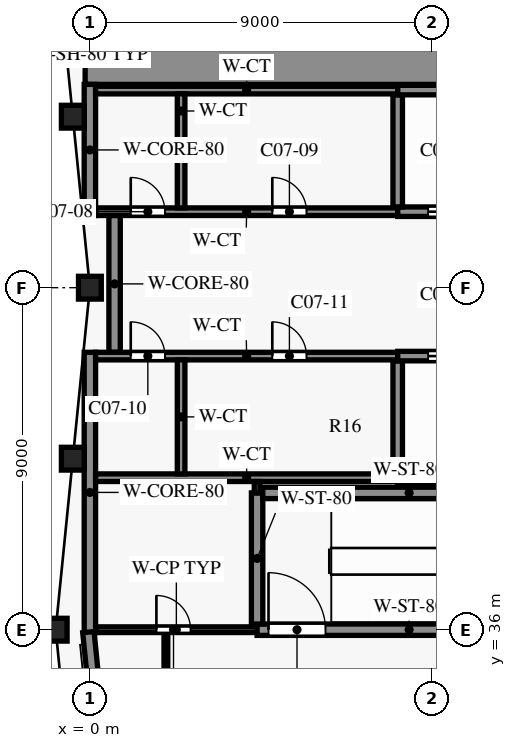
"""IFC4 building model, lengths in metres.
Left out: names, types, materials, properties, quantities, classifications, styles, units other than length and angle.
Written with IfcOpenShell. Run it as: python <this file> out.ifc"""

import sys

from ifc_helpers import new_model, si_unit, direction, frame, frame_2d, origin, origin_2d, place, context, subcontext, project, spatial, rectangle, hollow_rectangle, extrude, element, fill, save


model = new_model("IFC4")
c1 = context("Model", 3, precision=1e-05, world=origin(), true_north=direction((0.0, 1.0)))
c2 = subcontext(c1, "Body", "Model", "MODEL_VIEW")
j1 = project(units=[si_unit("LENGTHUNIT", "METRE"), si_unit("PLANEANGLEUNIT", "RADIAN")], contexts=[c1])
p1 = place(None, origin())
s1 = spatial("IfcSite", under=j1, at=p1, CompositionType="ELEMENT")
p2 = place(p1, origin())
s2 = spatial("IfcBuilding", under=s1, at=p2, CompositionType="ELEMENT")
p3 = place(p2, frame((0.0, 0.0, 32.0)))
s3 = spatial("IfcBuildingStorey", under=s2, at=p3, CompositionType="ELEMENT", Elevation=32.0)
for number, where, z_axis, x_axis in (
    (1, (-0.45, 49.5, 0.0), (0.0, 0.0, 1.0), (1.0, 0.0, 0.0)),
    (2, (0.0, 45.0, 0.0), (0.0, 0.0, 1.0), (1.0, 0.0, 0.0)),
    (3, (-0.45, 40.5, 0.0), (0.0, 0.0, 1.0), (1.0, 0.0, 0.0)),
    (4, (-0.9, 36.0, 0.0), (0.0, 0.0, 1.0), (1.0, 0.0, 0.0)),
):
    element("IfcColumn", number, at=place(p3, frame(where, z_axis=z_axis, x_axis=x_axis)), inside=s3, PredefinedType="COLUMN", context=c2, shape_type="SweptSolid", body=[
        extrude(hollow_rectangle(XDim=0.6, YDim=0.6, WallThickness=0.03, InnerFilletRadius=0.03, OuterFilletRadius=0.06, at=origin_2d()), origin(), (0.0, 0.0, 1.0), 5.5),
    ])
p4 = place(p3, frame((0.856, 26.985, 0.0), z_axis=(0.0, 0.0, 1.0), x_axis=(-0.099503719021, 0.99503719021, 0.0)))
e5 = element("IfcWall", 5, at=p4, inside=s3, PredefinedType="SOLIDWALL", context=c2, shape_type="SweptSolid", body=[
    extrude(rectangle(XDim=8.995, YDim=0.3, at=frame_2d((4.498, 0.0))), origin(), (0.0, 0.0, 1.0), 4.85),
])
p5 = place(p3, frame((0.15, 36.0, 0.0), z_axis=(0.0, 0.0, 1.0), x_axis=(1.0, 0.0, 0.0)))
e6 = element("IfcWall", 6, at=p5, inside=s3, PredefinedType="PARTITIONING", context=c2, shape_type="SweptSolid", body=[
    extrude(rectangle(XDim=4.25, YDim=0.15, at=frame_2d((2.125, 0.0))), origin(), (0.0, 0.0, 1.0), 5.2),
])
p6 = place(p5, frame((1.6, 0.0, 0.0)))
e7 = element("IfcOpeningElement", 7, at=p6, cuts=e6, PredefinedType="OPENING", context=c2, shape_type="SweptSolid", body=[
    extrude(rectangle(XDim=0.9, YDim=2.1, at=frame_2d((0.45, 1.05))), frame((0.0, 0.085, 0.0), z_axis=(0.0, -1.0, 0.0), x_axis=(1.0, 0.0, 0.0)), (0.0, 0.0, 1.0), 0.17),
])
p7 = place(p3, frame((4.4, 36.0, 0.0), z_axis=(0.0, 0.0, 1.0), x_axis=(1.0, 0.0, 0.0)))
e8 = element("IfcWall", 8, at=p7, inside=s3, PredefinedType="SHEAR", context=c2, shape_type="SweptSolid", body=[
    extrude(rectangle(XDim=8.0, YDim=0.3, at=frame_2d((4.0, 0.0))), origin(), (0.0, 0.0, 1.0), 5.2),
])
p8 = place(p7, frame((0.3, 0.0, 0.0)))
e9 = element("IfcOpeningElement", 9, at=p8, cuts=e8, PredefinedType="OPENING", context=c2, shape_type="SweptSolid", body=[
    extrude(rectangle(XDim=1.5, YDim=2.2, at=frame_2d((0.75, 1.1))), frame((0.0, 0.16, 0.0), z_axis=(0.0, -1.0, 0.0), x_axis=(1.0, 0.0, 0.0)), (0.0, 0.0, 1.0), 0.32),
])
p9 = place(p3, frame((4.55, 39.6, 0.0), z_axis=(0.0, 0.0, 1.0), x_axis=(1.0, 0.0, 0.0)))
e10 = element("IfcWall", 10, at=p9, inside=s3, PredefinedType="SHEAR", context=c2, shape_type="SweptSolid", body=[
    extrude(rectangle(XDim=7.7, YDim=0.3, at=frame_2d((3.85, 0.0))), origin(), (0.0, 0.0, 1.0), 5.2),
])
p10 = place(p3, frame((0.15, 40.0, 0.0), z_axis=(0.0, 0.0, 1.0), x_axis=(1.0, 0.0, 0.0)))
e11 = element("IfcWall", 11, at=p10, inside=s3, PredefinedType="PARTITIONING", context=c2, shape_type="SweptSolid", body=[
    extrude(rectangle(XDim=7.95, YDim=0.2, at=frame_2d((3.975, 0.0))), origin(), (0.0, 0.0, 1.0), 5.2),
])
p11 = place(p3, frame((8.1, 40.0, 0.0), z_axis=(0.0, 0.0, 1.0), x_axis=(1.0, 0.0, 0.0)))
e12 = element("IfcWall", 12, at=p11, inside=s3, PredefinedType="SHEAR", context=c2, shape_type="SweptSolid", body=[
    extrude(rectangle(XDim=16.075, YDim=0.25, at=frame_2d((8.038, 0.0))), origin(), (0.0, 0.0, 1.0), 5.2),
])
p12 = place(p3, frame((0.15, 43.2, 0.0), z_axis=(0.0, 0.0, 1.0), x_axis=(1.0, 0.0, 0.0)))
e13 = element("IfcWall", 13, at=p12, inside=s3, PredefinedType="PARTITIONING", context=c2, shape_type="SweptSolid", body=[
    extrude(rectangle(XDim=7.95, YDim=0.2, at=frame_2d((3.975, 0.0))), origin(), (0.0, 0.0, 1.0), 5.2),
])
p13 = place(p12, frame((0.925, 0.0, 0.0)))
e14 = element("IfcOpeningElement", 14, at=p13, cuts=e13, PredefinedType="OPENING", context=c2, shape_type="SweptSolid", body=[
    extrude(rectangle(XDim=0.9, YDim=2.1, at=frame_2d((0.45, 1.05))), frame((0.0, 0.11, 0.0), z_axis=(0.0, -1.0, 0.0), x_axis=(1.0, 0.0, 0.0)), (0.0, 0.0, 1.0), 0.22),
])
p14 = place(p12, frame((4.65, 0.0, 0.0)))
e15 = element("IfcOpeningElement", 15, at=p14, cuts=e13, PredefinedType="OPENING", context=c2, shape_type="SweptSolid", body=[
    extrude(rectangle(XDim=0.9, YDim=2.1, at=frame_2d((0.45, 1.05))), frame((0.0, 0.11, 0.0), z_axis=(0.0, -1.0, 0.0), x_axis=(1.0, 0.0, 0.0)), (0.0, 0.0, 1.0), 0.22),
])
p15 = place(p3, frame((8.1, 43.2, 0.0), z_axis=(0.0, 0.0, 1.0), x_axis=(1.0, 0.0, 0.0)))
e16 = element("IfcWall", 16, at=p15, inside=s3, PredefinedType="SHEAR", context=c2, shape_type="SweptSolid", body=[
    extrude(rectangle(XDim=16.075, YDim=0.25, at=frame_2d((8.038, 0.0))), origin(), (0.0, 0.0, 1.0), 5.2),
])
p16 = place(p15, frame((14.3, 0.0, 0.0)))
e17 = element("IfcOpeningElement", 17, at=p16, cuts=e16, PredefinedType="OPENING", context=c2, shape_type="SweptSolid", body=[
    extrude(rectangle(XDim=1.1, YDim=2.1, at=frame_2d((0.55, 1.05))), frame((0.0, 0.135, 0.0), z_axis=(0.0, -1.0, 0.0), x_axis=(1.0, 0.0, 0.0)), (0.0, 0.0, 1.0), 0.27),
])
p17 = place(p15, frame((0.8, 0.0, 0.0)))
e18 = element("IfcOpeningElement", 18, at=p17, cuts=e16, PredefinedType="OPENING", context=c2, shape_type="SweptSolid", body=[
    extrude(rectangle(XDim=1.1, YDim=2.1, at=frame_2d((0.55, 1.05))), frame((0.0, 0.135, 0.0), z_axis=(0.0, -1.0, 0.0), x_axis=(1.0, 0.0, 0.0)), (0.0, 0.0, 1.0), 0.27),
])
p18 = place(p15, frame((3.5, 0.0, 0.0)))
e19 = element("IfcOpeningElement", 19, at=p18, cuts=e16, PredefinedType="OPENING", context=c2, shape_type="SweptSolid", body=[
    extrude(rectangle(XDim=1.1, YDim=2.1, at=frame_2d((0.55, 1.05))), frame((0.0, 0.135, 0.0), z_axis=(0.0, -1.0, 0.0), x_axis=(1.0, 0.0, 0.0)), (0.0, 0.0, 1.0), 0.27),
])
p19 = place(p15, frame((6.2, 0.0, 0.0)))
e20 = element("IfcOpeningElement", 20, at=p19, cuts=e16, PredefinedType="OPENING", context=c2, shape_type="SweptSolid", body=[
    extrude(rectangle(XDim=1.1, YDim=2.1, at=frame_2d((0.55, 1.05))), frame((0.0, 0.135, 0.0), z_axis=(0.0, -1.0, 0.0), x_axis=(1.0, 0.0, 0.0)), (0.0, 0.0, 1.0), 0.27),
])
p20 = place(p15, frame((8.9, 0.0, 0.0)))
e21 = element("IfcOpeningElement", 21, at=p20, cuts=e16, PredefinedType="OPENING", context=c2, shape_type="SweptSolid", body=[
    extrude(rectangle(XDim=1.1, YDim=2.1, at=frame_2d((0.55, 1.05))), frame((0.0, 0.135, 0.0), z_axis=(0.0, -1.0, 0.0), x_axis=(1.0, 0.0, 0.0)), (0.0, 0.0, 1.0), 0.27),
])
p21 = place(p15, frame((11.6, 0.0, 0.0)))
e22 = element("IfcOpeningElement", 22, at=p21, cuts=e16, PredefinedType="OPENING", context=c2, shape_type="SweptSolid", body=[
    extrude(rectangle(XDim=1.1, YDim=2.1, at=frame_2d((0.55, 1.05))), frame((0.0, 0.135, 0.0), z_axis=(0.0, -1.0, 0.0), x_axis=(1.0, 0.0, 0.0)), (0.0, 0.0, 1.0), 0.27),
])
p22 = place(p3, frame((0.15, 47.0, 0.0), z_axis=(0.0, 0.0, 1.0), x_axis=(1.0, 0.0, 0.0)))
e23 = element("IfcWall", 23, at=p22, inside=s3, PredefinedType="PARTITIONING", context=c2, shape_type="SweptSolid", body=[
    extrude(rectangle(XDim=7.95, YDim=0.2, at=frame_2d((3.975, 0.0))), origin(), (0.0, 0.0, 1.0), 5.2),
])
p23 = place(p22, frame((0.925, 0.0, 0.0)))
e24 = element("IfcOpeningElement", 24, at=p23, cuts=e23, PredefinedType="OPENING", context=c2, shape_type="SweptSolid", body=[
    extrude(rectangle(XDim=0.9, YDim=2.1, at=frame_2d((0.45, 1.05))), frame((0.0, 0.11, 0.0), z_axis=(0.0, -1.0, 0.0), x_axis=(1.0, 0.0, 0.0)), (0.0, 0.0, 1.0), 0.22),
])
p24 = place(p22, frame((4.65, 0.0, 0.0)))
e25 = element("IfcOpeningElement", 25, at=p24, cuts=e23, PredefinedType="OPENING", context=c2, shape_type="SweptSolid", body=[
    extrude(rectangle(XDim=0.9, YDim=2.1, at=frame_2d((0.45, 1.05))), frame((0.0, 0.11, 0.0), z_axis=(0.0, -1.0, 0.0), x_axis=(1.0, 0.0, 0.0)), (0.0, 0.0, 1.0), 0.22),
])
p25 = place(p3, frame((8.1, 47.0, 0.0), z_axis=(0.0, 0.0, 1.0), x_axis=(1.0, 0.0, 0.0)))
e26 = element("IfcWall", 26, at=p25, inside=s3, PredefinedType="SHEAR", context=c2, shape_type="SweptSolid", body=[
    extrude(rectangle(XDim=13.5, YDim=0.25, at=frame_2d((6.75, 0.0))), origin(), (0.0, 0.0, 1.0), 5.2),
])
p26 = place(p25, frame((0.8, 0.0, 0.0)))
e27 = element("IfcOpeningElement", 27, at=p26, cuts=e26, PredefinedType="OPENING", context=c2, shape_type="SweptSolid", body=[
    extrude(rectangle(XDim=1.1, YDim=2.1, at=frame_2d((0.55, 1.05))), frame((0.0, 0.135, 0.0), z_axis=(0.0, -1.0, 0.0), x_axis=(1.0, 0.0, 0.0)), (0.0, 0.0, 1.0), 0.27),
])
p27 = place(p25, frame((3.5, 0.0, 0.0)))
e28 = element("IfcOpeningElement", 28, at=p27, cuts=e26, PredefinedType="OPENING", context=c2, shape_type="SweptSolid", body=[
    extrude(rectangle(XDim=1.1, YDim=2.1, at=frame_2d((0.55, 1.05))), frame((0.0, 0.135, 0.0), z_axis=(0.0, -1.0, 0.0), x_axis=(1.0, 0.0, 0.0)), (0.0, 0.0, 1.0), 0.27),
])
p28 = place(p25, frame((6.2, 0.0, 0.0)))
e29 = element("IfcOpeningElement", 29, at=p28, cuts=e26, PredefinedType="OPENING", context=c2, shape_type="SweptSolid", body=[
    extrude(rectangle(XDim=1.1, YDim=2.1, at=frame_2d((0.55, 1.05))), frame((0.0, 0.135, 0.0), z_axis=(0.0, -1.0, 0.0), x_axis=(1.0, 0.0, 0.0)), (0.0, 0.0, 1.0), 0.27),
])
p29 = place(p25, frame((8.9, 0.0, 0.0)))
e30 = element("IfcOpeningElement", 30, at=p29, cuts=e26, PredefinedType="OPENING", context=c2, shape_type="SweptSolid", body=[
    extrude(rectangle(XDim=1.1, YDim=2.1, at=frame_2d((0.55, 1.05))), frame((0.0, 0.135, 0.0), z_axis=(0.0, -1.0, 0.0), x_axis=(1.0, 0.0, 0.0)), (0.0, 0.0, 1.0), 0.27),
])
p30 = place(p25, frame((11.6, 0.0, 0.0)))
e31 = element("IfcOpeningElement", 31, at=p30, cuts=e26, PredefinedType="OPENING", context=c2, shape_type="SweptSolid", body=[
    extrude(rectangle(XDim=1.1, YDim=2.1, at=frame_2d((0.55, 1.05))), frame((0.0, 0.135, 0.0), z_axis=(0.0, -1.0, 0.0), x_axis=(1.0, 0.0, 0.0)), (0.0, 0.0, 1.0), 0.27),
])
p31 = place(p3, frame((0.15, 50.2, 0.0), z_axis=(0.0, 0.0, 1.0), x_axis=(1.0, 0.0, 0.0)))
e32 = element("IfcWall", 32, at=p31, inside=s3, PredefinedType="PARTITIONING", context=c2, shape_type="SweptSolid", body=[
    extrude(rectangle(XDim=7.95, YDim=0.2, at=frame_2d((3.975, 0.0))), origin(), (0.0, 0.0, 1.0), 5.2),
])
p32 = place(p3, frame((8.1, 50.2, 0.0), z_axis=(0.0, 0.0, 1.0), x_axis=(1.0, 0.0, 0.0)))
e33 = element("IfcWall", 33, at=p32, inside=s3, PredefinedType="SHEAR", context=c2, shape_type="SweptSolid", body=[
    extrude(rectangle(XDim=13.375, YDim=0.25, at=frame_2d((6.688, 0.0))), origin(), (0.0, 0.0, 1.0), 5.2),
])
p33 = place(p3, frame((-0.125, 51.0, 0.0), z_axis=(0.0, 0.0, 1.0), x_axis=(1.0, 0.0, 0.0)))
e34 = element("IfcWall", 34, at=p33, inside=s3, PredefinedType="SHEAR", context=c2, shape_type="SweptSolid", body=[
    extrude(rectangle(XDim=21.625, YDim=1.3, at=frame_2d((10.812, 0.0))), origin(), (0.0, 0.0, 1.0), 5.2),
])
p34 = place(p3, frame((0.0, 35.925, 0.0), z_axis=(0.0, 0.0, 1.0), x_axis=(0.0, 1.0, 0.0)))
e35 = element("IfcWall", 35, at=p34, inside=s3, PredefinedType="SHEAR", context=c2, shape_type="SweptSolid", body=[
    extrude(rectangle(XDim=7.375, YDim=0.3, at=frame_2d((3.688, 0.0))), origin(), (0.0, 0.0, 1.0), 5.2),
])
p35 = place(p3, frame((0.0, 46.9, 0.0), z_axis=(0.0, 0.0, 1.0), x_axis=(0.0, 1.0, 0.0)))
e36 = element("IfcWall", 36, at=p35, inside=s3, PredefinedType="SHEAR", context=c2, shape_type="SweptSolid", body=[
    extrude(rectangle(XDim=3.45, YDim=0.3, at=frame_2d((1.725, 0.0))), origin(), (0.0, 0.0, 1.0), 5.2),
])
p36 = place(p3, frame((0.65, 43.3, 0.0), z_axis=(0.0, 0.0, 1.0), x_axis=(0.0, 1.0, 0.0)))
e37 = element("IfcWall", 37, at=p36, inside=s3, PredefinedType="SHEAR", context=c2, shape_type="SweptSolid", body=[
    extrude(rectangle(XDim=3.6, YDim=0.3, at=frame_2d((1.8, 0.0))), origin(), (0.0, 0.0, 1.0), 5.2),
])
for number, where, z_axis, x_axis in (
    (38, (2.4, 40.1, 0.0), (0.0, 0.0, 1.0), (0.0, 1.0, 0.0)),
    (39, (2.4, 47.1, 0.0), (0.0, 0.0, 1.0), (0.0, 1.0, 0.0)),
):
    element("IfcWall", number, at=place(p3, frame(where, z_axis=z_axis, x_axis=x_axis)), inside=s3, PredefinedType="PARTITIONING", context=c2, shape_type="SweptSolid", body=[
        extrude(rectangle(XDim=3.0, YDim=0.2, at=frame_2d((1.5, 0.0))), origin(), (0.0, 0.0, 1.0), 5.2),
    ])
p37 = place(p3, frame((4.4, 39.6, 0.0), z_axis=(0.0, 0.0, 1.0), x_axis=(0.0, 1.0, 0.0)))
e40 = element("IfcWall", 40, at=p37, inside=s3, PredefinedType="PARTITIONING", context=c2, shape_type="SweptSolid", body=[
    extrude(rectangle(XDim=0.3, YDim=0.15, at=frame_2d((0.15, 0.0))), origin(), (0.0, 0.0, 1.0), 5.2),
])
p38 = place(p3, frame((4.4, 36.15, 0.0), z_axis=(0.0, 0.0, 1.0), x_axis=(0.0, 1.0, 0.0)))
e41 = element("IfcWall", 41, at=p38, inside=s3, PredefinedType="SHEAR", context=c2, shape_type="SweptSolid", body=[
    extrude(rectangle(XDim=3.45, YDim=0.3, at=frame_2d((1.725, 0.0))), origin(), (0.0, 0.0, 1.0), 5.2),
])
for number, where, z_axis, x_axis in (
    (42, (8.1, 40.125, 0.0), (0.0, 0.0, 1.0), (0.0, 1.0, 0.0)),
    (43, (8.1, 47.125, 0.0), (0.0, 0.0, 1.0), (0.0, 1.0, 0.0)),
):
    element("IfcWall", number, at=place(p3, frame(where, z_axis=z_axis, x_axis=x_axis)), inside=s3, PredefinedType="SHEAR", context=c2, shape_type="SweptSolid", body=[
        extrude(rectangle(XDim=2.95, YDim=0.25, at=frame_2d((1.475, 0.0))), origin(), (0.0, 0.0, 1.0), 5.2),
    ])
p39 = place(p3, frame((2.0, 33.75, 0.0), z_axis=(0.0, 0.0, 1.0), x_axis=(0.0, 1.0, 0.0)))
e44 = element("IfcWall", 44, at=p39, inside=s3, PredefinedType="PARTITIONING", context=c2, shape_type="SweptSolid", body=[
    extrude(rectangle(XDim=2.1, YDim=0.1, at=frame_2d((1.05, 0.0))), origin(), (0.0, 0.0, 1.0), 5.18),
])
p40 = place(p6, origin())
e45 = element("IfcDoor", 45, at=p40, inside=s3, OperationType="SINGLE_SWING_LEFT", PredefinedType="DOOR", context=c2, shape_type="SweptSolid", body=[
    extrude(rectangle(XDim=0.9, YDim=2.1, at=frame_2d((0.45, 1.05))), frame((0.0, 0.025, 0.0), z_axis=(0.0, -1.0, 0.0), x_axis=(1.0, 0.0, 0.0)), (0.0, 0.0, 1.0), 0.05),
])
fill(e7, e45)
p41 = place(p23, origin())
e46 = element("IfcDoor", 46, at=p41, inside=s3, OperationType="SINGLE_SWING_RIGHT", PredefinedType="DOOR", context=c2, shape_type="SweptSolid", body=[
    extrude(rectangle(XDim=0.9, YDim=2.1, at=frame_2d((0.45, 1.05))), frame((0.0, 0.025, 0.0), z_axis=(0.0, -1.0, 0.0), x_axis=(1.0, 0.0, 0.0)), (0.0, 0.0, 1.0), 0.05),
])
fill(e24, e46)
p42 = place(p24, origin())
e47 = element("IfcDoor", 47, at=p42, inside=s3, OperationType="SINGLE_SWING_LEFT", PredefinedType="DOOR", context=c2, shape_type="SweptSolid", body=[
    extrude(rectangle(XDim=0.9, YDim=2.1, at=frame_2d((0.45, 1.05))), frame((0.0, 0.025, 0.0), z_axis=(0.0, -1.0, 0.0), x_axis=(1.0, 0.0, 0.0)), (0.0, 0.0, 1.0), 0.05),
])
fill(e25, e47)
p43 = place(p13, origin())
e48 = element("IfcDoor", 48, at=p43, inside=s3, OperationType="SINGLE_SWING_LEFT", PredefinedType="DOOR", context=c2, shape_type="SweptSolid", body=[
    extrude(rectangle(XDim=0.9, YDim=2.1, at=frame_2d((0.45, 1.05))), frame((0.0, 0.025, 0.0), z_axis=(0.0, -1.0, 0.0), x_axis=(1.0, 0.0, 0.0)), (0.0, 0.0, 1.0), 0.05),
])
fill(e14, e48)
p44 = place(p14, origin())
e49 = element("IfcDoor", 49, at=p44, inside=s3, OperationType="SINGLE_SWING_RIGHT", PredefinedType="DOOR", context=c2, shape_type="SweptSolid", body=[
    extrude(rectangle(XDim=0.9, YDim=2.1, at=frame_2d((0.45, 1.05))), frame((0.0, 0.025, 0.0), z_axis=(0.0, -1.0, 0.0), x_axis=(1.0, 0.0, 0.0)), (0.0, 0.0, 1.0), 0.05),
])
fill(e15, e49)
p45 = place(p8, origin())
e50 = element("IfcDoor", 50, at=p45, inside=s3, OperationType="SINGLE_SWING_RIGHT", PredefinedType="DOOR", context=c2, shape_type="SweptSolid", body=[
    extrude(rectangle(XDim=1.5, YDim=2.2, at=frame_2d((0.75, 1.1))), frame((0.0, 0.025, 0.0), z_axis=(0.0, -1.0, 0.0), x_axis=(1.0, 0.0, 0.0)), (0.0, 0.0, 1.0), 0.05),
])
fill(e9, e50)
p46 = place(p17, origin())
e51 = element("IfcDoor", 51, at=p46, inside=s3, OperationType="DOUBLE_DOOR_SLIDING", PredefinedType="DOOR", context=c2, shape_type="SweptSolid", body=[
    extrude(rectangle(XDim=1.1, YDim=2.1, at=frame_2d((0.55, 1.05))), frame((0.0, 0.025, 0.0), z_axis=(0.0, -1.0, 0.0), x_axis=(1.0, 0.0, 0.0)), (0.0, 0.0, 1.0), 0.05),
])
fill(e18, e51)
p47 = place(p26, origin())
e52 = element("IfcDoor", 52, at=p47, inside=s3, OperationType="DOUBLE_DOOR_SLIDING", PredefinedType="DOOR", context=c2, shape_type="SweptSolid", body=[
    extrude(rectangle(XDim=1.1, YDim=2.1, at=frame_2d((0.55, 1.05))), frame((0.0, 0.025, 0.0), z_axis=(0.0, -1.0, 0.0), x_axis=(1.0, 0.0, 0.0)), (0.0, 0.0, 1.0), 0.05),
])
fill(e27, e52)
save(model, sys.argv[1])
